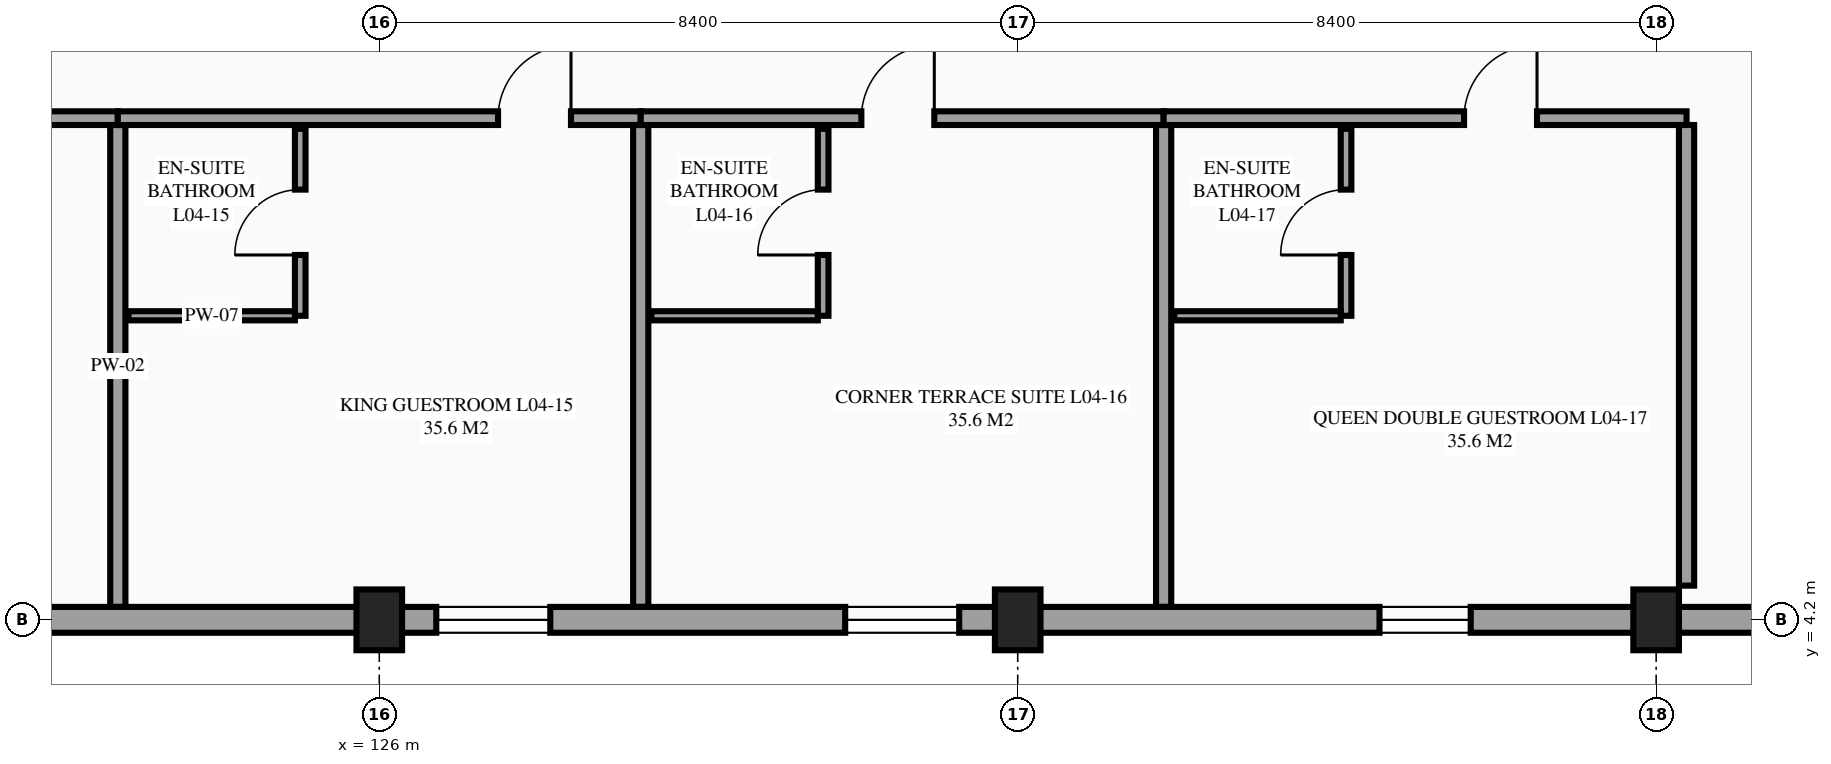
"""IFC4 building model, lengths in metres.
Left out: names, types, materials, properties, quantities, classifications, styles, units other than length and angle.
Written with IfcOpenShell. Run it as: python <this file> out.ifc"""

import sys

from ifc_helpers import new_model, si_unit, direction, frame, frame_2d, origin, origin_2d, place, context, subcontext, project, spatial, rectangle, extrude, element, fill, save


model = new_model("IFC4")
c1 = context("Model", 3, precision=1e-05, world=origin(), true_north=direction((0.0, 1.0)))
c2 = subcontext(c1, "Body", "Model", "MODEL_VIEW")
j1 = project(units=[si_unit("LENGTHUNIT", "METRE"), si_unit("PLANEANGLEUNIT", "RADIAN")], contexts=[c1])
p1 = place(None, origin())
s1 = spatial("IfcSite", under=j1, at=p1, CompositionType="ELEMENT")
p2 = place(p1, origin())
s2 = spatial("IfcBuilding", under=s1, at=p2, CompositionType="ELEMENT")
p3 = place(p2, frame((0.0, 0.0, 18.3)))
s3 = spatial("IfcBuildingStorey", under=s2, at=p3, CompositionType="ELEMENT", Elevation=18.3)
for number, where, z_axis, x_axis in (
    (1, (126.0, 4.2, 0.0), (0.0, 0.0, 1.0), (1.0, 0.0, 0.0)),
    (2, (134.4, 4.2, 0.0), (0.0, 0.0, 1.0), (1.0, 0.0, 0.0)),
    (3, (142.8, 4.2, 0.0), (0.0, 0.0, 1.0), (1.0, 0.0, 0.0)),
):
    element("IfcColumn", number, at=place(p3, frame(where, z_axis=z_axis, x_axis=x_axis)), inside=s3, PredefinedType="COLUMN", context=c2, shape_type="SweptSolid", body=[
        extrude(rectangle(XDim=0.6, YDim=0.8, at=origin_2d()), origin(), (0.0, 0.0, 1.0), 3.6),
    ])
p4 = place(p3, frame((115.68, 10.8, 0.0), z_axis=(0.0, 0.0, 1.0), x_axis=(1.0, 0.0, 0.0)))
e4 = element("IfcWall", 4, at=p4, inside=s3, PredefinedType="PARTITIONING", context=c2, shape_type="SweptSolid", body=[
    extrude(rectangle(XDim=6.88, YDim=0.18, at=frame_2d((3.44, 0.0))), origin(), (0.0, 0.0, 1.0), 3.375),
])
p5 = place(p4, frame((4.653, 0.0, 0.0)))
e5 = element("IfcOpeningElement", 5, at=p5, cuts=e4, PredefinedType="OPENING", context=c2, shape_type="SweptSolid", body=[
    extrude(rectangle(XDim=0.96, YDim=2.15, at=frame_2d((0.48, 1.075))), frame((0.0, 0.1, 0.0), z_axis=(0.0, -1.0, 0.0), x_axis=(1.0, 0.0, 0.0)), (0.0, 0.0, 1.0), 0.2),
])
p6 = place(p3, frame((122.56, 4.37, 0.0), z_axis=(0.0, 0.0, 1.0), x_axis=(0.0, 1.0, 0.0)))
e6 = element("IfcWall", 6, at=p6, inside=s3, PredefinedType="PARTITIONING", context=c2, shape_type="SweptSolid", body=[
    extrude(rectangle(XDim=6.34, YDim=0.2, at=frame_2d((3.17, 0.0))), origin(), (0.0, 0.0, 1.0), 3.375),
])
p7 = place(p3, frame((122.56, 10.8, 0.0), z_axis=(0.0, 0.0, 1.0), x_axis=(1.0, 0.0, 0.0)))
e7 = element("IfcWall", 7, at=p7, inside=s3, PredefinedType="PARTITIONING", context=c2, shape_type="SweptSolid", body=[
    extrude(rectangle(XDim=6.88, YDim=0.18, at=frame_2d((3.44, 0.0))), origin(), (0.0, 0.0, 1.0), 3.375),
])
p8 = place(p7, frame((5.003, 0.0, 0.0)))
e8 = element("IfcOpeningElement", 8, at=p8, cuts=e7, PredefinedType="OPENING", context=c2, shape_type="SweptSolid", body=[
    extrude(rectangle(XDim=0.96, YDim=2.15, at=frame_2d((0.48, 1.075))), frame((0.0, 0.1, 0.0), z_axis=(0.0, -1.0, 0.0), x_axis=(1.0, 0.0, 0.0)), (0.0, 0.0, 1.0), 0.2),
])
p9 = place(p3, frame((129.44, 4.37, 0.0), z_axis=(0.0, 0.0, 1.0), x_axis=(0.0, 1.0, 0.0)))
e9 = element("IfcWall", 9, at=p9, inside=s3, PredefinedType="PARTITIONING", context=c2, shape_type="SweptSolid", body=[
    extrude(rectangle(XDim=6.34, YDim=0.2, at=frame_2d((3.17, 0.0))), origin(), (0.0, 0.0, 1.0), 3.375),
])
p10 = place(p3, frame((124.96, 8.2, 0.0), z_axis=(0.0, 0.0, 1.0), x_axis=(0.0, 1.0, 0.0)))
e10 = element("IfcWall", 10, at=p10, inside=s3, PredefinedType="PARTITIONING", context=c2, shape_type="SweptSolid", body=[
    extrude(rectangle(XDim=2.46, YDim=0.14, at=frame_2d((1.23, 0.0))), origin(), (0.0, 0.0, 1.0), 3.375),
])
p11 = place(p10, frame((0.8, 0.0, 0.0)))
e11 = element("IfcOpeningElement", 11, at=p11, cuts=e10, PredefinedType="OPENING", context=c2, shape_type="SweptSolid", body=[
    extrude(rectangle(XDim=0.86, YDim=2.1, at=frame_2d((0.43, 1.05))), frame((0.0, 0.08, 0.0), z_axis=(0.0, -1.0, 0.0), x_axis=(1.0, 0.0, 0.0)), (0.0, 0.0, 1.0), 0.16),
])
p12 = place(p3, frame((122.7, 8.2, 0.0), z_axis=(0.0, 0.0, 1.0), x_axis=(1.0, 0.0, 0.0)))
e12 = element("IfcWall", 12, at=p12, inside=s3, PredefinedType="PARTITIONING", context=c2, shape_type="SweptSolid", body=[
    extrude(rectangle(XDim=2.19, YDim=0.12, at=frame_2d((1.095, 0.0))), origin(), (0.0, 0.0, 1.0), 3.375),
])
p13 = place(p3, frame((129.44, 10.8, 0.0), z_axis=(0.0, 0.0, 1.0), x_axis=(1.0, 0.0, 0.0)))
e13 = element("IfcWall", 13, at=p13, inside=s3, PredefinedType="PARTITIONING", context=c2, shape_type="SweptSolid", body=[
    extrude(rectangle(XDim=6.88, YDim=0.18, at=frame_2d((3.44, 0.0))), origin(), (0.0, 0.0, 1.0), 3.375),
])
p14 = place(p13, frame((2.903, 0.0, 0.0)))
e14 = element("IfcOpeningElement", 14, at=p14, cuts=e13, PredefinedType="OPENING", context=c2, shape_type="SweptSolid", body=[
    extrude(rectangle(XDim=0.96, YDim=2.15, at=frame_2d((0.48, 1.075))), frame((0.0, 0.1, 0.0), z_axis=(0.0, -1.0, 0.0), x_axis=(1.0, 0.0, 0.0)), (0.0, 0.0, 1.0), 0.2),
])
p15 = place(p3, frame((136.32, 4.37, 0.0), z_axis=(0.0, 0.0, 1.0), x_axis=(0.0, 1.0, 0.0)))
e15 = element("IfcWall", 15, at=p15, inside=s3, PredefinedType="PARTITIONING", context=c2, shape_type="SweptSolid", body=[
    extrude(rectangle(XDim=6.34, YDim=0.2, at=frame_2d((3.17, 0.0))), origin(), (0.0, 0.0, 1.0), 3.375),
])
p16 = place(p3, frame((131.84, 8.2, 0.0), z_axis=(0.0, 0.0, 1.0), x_axis=(0.0, 1.0, 0.0)))
e16 = element("IfcWall", 16, at=p16, inside=s3, PredefinedType="PARTITIONING", context=c2, shape_type="SweptSolid", body=[
    extrude(rectangle(XDim=2.46, YDim=0.14, at=frame_2d((1.23, 0.0))), origin(), (0.0, 0.0, 1.0), 3.375),
])
p17 = place(p16, frame((0.8, 0.0, 0.0)))
e17 = element("IfcOpeningElement", 17, at=p17, cuts=e16, PredefinedType="OPENING", context=c2, shape_type="SweptSolid", body=[
    extrude(rectangle(XDim=0.86, YDim=2.1, at=frame_2d((0.43, 1.05))), frame((0.0, 0.08, 0.0), z_axis=(0.0, -1.0, 0.0), x_axis=(1.0, 0.0, 0.0)), (0.0, 0.0, 1.0), 0.16),
])
p18 = place(p3, frame((129.58, 8.2, 0.0), z_axis=(0.0, 0.0, 1.0), x_axis=(1.0, 0.0, 0.0)))
e18 = element("IfcWall", 18, at=p18, inside=s3, PredefinedType="PARTITIONING", context=c2, shape_type="SweptSolid", body=[
    extrude(rectangle(XDim=2.19, YDim=0.12, at=frame_2d((1.095, 0.0))), origin(), (0.0, 0.0, 1.0), 3.375),
])
p19 = place(p3, frame((136.32, 10.8, 0.0), z_axis=(0.0, 0.0, 1.0), x_axis=(1.0, 0.0, 0.0)))
e19 = element("IfcWall", 19, at=p19, inside=s3, PredefinedType="PARTITIONING", context=c2, shape_type="SweptSolid", body=[
    extrude(rectangle(XDim=6.88, YDim=0.18, at=frame_2d((3.44, 0.0))), origin(), (0.0, 0.0, 1.0), 3.375),
])
p20 = place(p19, frame((3.953, 0.0, 0.0)))
e20 = element("IfcOpeningElement", 20, at=p20, cuts=e19, PredefinedType="OPENING", context=c2, shape_type="SweptSolid", body=[
    extrude(rectangle(XDim=0.96, YDim=2.15, at=frame_2d((0.48, 1.075))), frame((0.0, 0.1, 0.0), z_axis=(0.0, -1.0, 0.0), x_axis=(1.0, 0.0, 0.0)), (0.0, 0.0, 1.0), 0.2),
])
p21 = place(p3, frame((143.2, 4.65, 0.0), z_axis=(0.0, 0.0, 1.0), x_axis=(0.0, 1.0, 0.0)))
e21 = element("IfcWall", 21, at=p21, inside=s3, PredefinedType="PARTITIONING", context=c2, shape_type="SweptSolid", body=[
    extrude(rectangle(XDim=6.06, YDim=0.2, at=frame_2d((3.03, 0.0))), origin(), (0.0, 0.0, 1.0), 3.375),
])
p22 = place(p3, frame((138.72, 8.2, 0.0), z_axis=(0.0, 0.0, 1.0), x_axis=(0.0, 1.0, 0.0)))
e22 = element("IfcWall", 22, at=p22, inside=s3, PredefinedType="PARTITIONING", context=c2, shape_type="SweptSolid", body=[
    extrude(rectangle(XDim=2.46, YDim=0.14, at=frame_2d((1.23, 0.0))), origin(), (0.0, 0.0, 1.0), 3.375),
])
p23 = place(p22, frame((0.8, 0.0, 0.0)))
e23 = element("IfcOpeningElement", 23, at=p23, cuts=e22, PredefinedType="OPENING", context=c2, shape_type="SweptSolid", body=[
    extrude(rectangle(XDim=0.86, YDim=2.1, at=frame_2d((0.43, 1.05))), frame((0.0, 0.08, 0.0), z_axis=(0.0, -1.0, 0.0), x_axis=(1.0, 0.0, 0.0)), (0.0, 0.0, 1.0), 0.16),
])
p24 = place(p3, frame((136.46, 8.2, 0.0), z_axis=(0.0, 0.0, 1.0), x_axis=(1.0, 0.0, 0.0)))
e24 = element("IfcWall", 24, at=p24, inside=s3, PredefinedType="PARTITIONING", context=c2, shape_type="SweptSolid", body=[
    extrude(rectangle(XDim=2.19, YDim=0.12, at=frame_2d((1.095, 0.0))), origin(), (0.0, 0.0, 1.0), 3.375),
])
p25 = place(p3, frame((117.6, 4.2, 0.0), z_axis=(0.0, 0.0, 1.0), x_axis=(1.0, 0.0, 0.0)))
e25 = element("IfcWall", 25, at=p25, inside=s3, PredefinedType="STANDARD", context=c2, shape_type="SweptSolid", body=[
    extrude(rectangle(XDim=8.4, YDim=0.34, at=frame_2d((4.2, 0.0))), origin(), (0.0, 0.0, 1.0), 3.07),
])
p26 = place(p25, frame((0.77, 0.0, 0.85)))
e26 = element("IfcOpeningElement", 26, at=p26, cuts=e25, PredefinedType="OPENING", context=c2, shape_type="SweptSolid", body=[
    extrude(rectangle(XDim=1.5, YDim=1.5, at=frame_2d((0.75, 0.75))), frame((0.0, 0.18, 0.0), z_axis=(0.0, -1.0, 0.0), x_axis=(1.0, 0.0, 0.0)), (0.0, 0.0, 1.0), 0.36),
])
p27 = place(p3, frame((126.0, 4.2, 0.0), z_axis=(0.0, 0.0, 1.0), x_axis=(1.0, 0.0, 0.0)))
e27 = element("IfcWall", 27, at=p27, inside=s3, PredefinedType="STANDARD", context=c2, shape_type="SweptSolid", body=[
    extrude(rectangle(XDim=16.8, YDim=0.34, at=frame_2d((8.4, 0.0))), origin(), (0.0, 0.0, 1.0), 2.68),
])
p28 = place(p27, frame((0.75, 0.0, 0.85)))
e28 = element("IfcOpeningElement", 28, at=p28, cuts=e27, PredefinedType="OPENING", context=c2, shape_type="SweptSolid", body=[
    extrude(rectangle(XDim=1.5, YDim=1.5, at=frame_2d((0.75, 0.75))), frame((0.0, 0.18, 0.0), z_axis=(0.0, -1.0, 0.0), x_axis=(1.0, 0.0, 0.0)), (0.0, 0.0, 1.0), 0.36),
])
p29 = place(p27, frame((6.13, 0.0, 0.85)))
e29 = element("IfcOpeningElement", 29, at=p29, cuts=e27, PredefinedType="OPENING", context=c2, shape_type="SweptSolid", body=[
    extrude(rectangle(XDim=1.5, YDim=1.5, at=frame_2d((0.75, 0.75))), frame((0.0, 0.18, 0.0), z_axis=(0.0, -1.0, 0.0), x_axis=(1.0, 0.0, 0.0)), (0.0, 0.0, 1.0), 0.36),
])
p30 = place(p27, frame((13.16, 0.0, 0.85)))
e30 = element("IfcOpeningElement", 30, at=p30, cuts=e27, PredefinedType="OPENING", context=c2, shape_type="SweptSolid", body=[
    extrude(rectangle(XDim=1.2, YDim=1.5, at=frame_2d((0.6, 0.75))), frame((0.0, 0.18, 0.0), z_axis=(0.0, -1.0, 0.0), x_axis=(1.0, 0.0, 0.0)), (0.0, 0.0, 1.0), 0.36),
])
p31 = place(p3, frame((142.8, 4.2, 0.0), z_axis=(0.0, 0.0, 1.0), x_axis=(1.0, 0.0, 0.0)))
e31 = element("IfcWall", 31, at=p31, inside=s3, PredefinedType="STANDARD", context=c2, shape_type="SweptSolid", body=[
    extrude(rectangle(XDim=8.4, YDim=0.34, at=frame_2d((4.2, 0.0))), origin(), (0.0, 0.0, 1.0), 3.126),
])
p32 = place(p28, origin())
e32 = element("IfcWindow", 32, at=p32, inside=s3, PartitioningType="SINGLE_PANEL", PredefinedType="WINDOW", context=c2, shape_type="SweptSolid", body=[
    extrude(rectangle(XDim=1.5, YDim=1.5, at=frame_2d((0.75, 0.75))), frame((0.0, 0.03, 0.0), z_axis=(0.0, -1.0, 0.0), x_axis=(1.0, 0.0, 0.0)), (0.0, 0.0, 1.0), 0.06),
])
fill(e28, e32)
p33 = place(p29, origin())
e33 = element("IfcWindow", 33, at=p33, inside=s3, PartitioningType="SINGLE_PANEL", PredefinedType="WINDOW", context=c2, shape_type="SweptSolid", body=[
    extrude(rectangle(XDim=1.5, YDim=1.5, at=frame_2d((0.75, 0.75))), frame((0.0, 0.03, 0.0), z_axis=(0.0, -1.0, 0.0), x_axis=(1.0, 0.0, 0.0)), (0.0, 0.0, 1.0), 0.06),
])
fill(e29, e33)
p34 = place(p30, origin())
e34 = element("IfcWindow", 34, at=p34, inside=s3, PartitioningType="SINGLE_PANEL", PredefinedType="WINDOW", context=c2, shape_type="SweptSolid", body=[
    extrude(rectangle(XDim=1.2, YDim=1.5, at=frame_2d((0.6, 0.75))), frame((0.0, 0.03, 0.0), z_axis=(0.0, -1.0, 0.0), x_axis=(1.0, 0.0, 0.0)), (0.0, 0.0, 1.0), 0.06),
])
fill(e30, e34)
p35 = place(p8, origin())
e35 = element("IfcDoor", 35, at=p35, inside=s3, OperationType="SINGLE_SWING_RIGHT", PredefinedType="DOOR", context=c2, shape_type="SweptSolid", body=[
    extrude(rectangle(XDim=0.96, YDim=2.15, at=frame_2d((0.48, 1.075))), frame((0.0, 0.025, 0.0), z_axis=(0.0, -1.0, 0.0), x_axis=(1.0, 0.0, 0.0)), (0.0, 0.0, 1.0), 0.05),
])
fill(e8, e35)
p36 = place(p11, origin())
e36 = element("IfcDoor", 36, at=p36, inside=s3, OperationType="SINGLE_SWING_LEFT", PredefinedType="DOOR", context=c2, shape_type="SweptSolid", body=[
    extrude(rectangle(XDim=0.86, YDim=2.1, at=frame_2d((0.43, 1.05))), frame((0.0, 0.025, 0.0), z_axis=(0.0, -1.0, 0.0), x_axis=(1.0, 0.0, 0.0)), (0.0, 0.0, 1.0), 0.05),
])
fill(e11, e36)
p37 = place(p14, origin())
e37 = element("IfcDoor", 37, at=p37, inside=s3, OperationType="SINGLE_SWING_RIGHT", PredefinedType="DOOR", context=c2, shape_type="SweptSolid", body=[
    extrude(rectangle(XDim=0.96, YDim=2.15, at=frame_2d((0.48, 1.075))), frame((0.0, 0.025, 0.0), z_axis=(0.0, -1.0, 0.0), x_axis=(1.0, 0.0, 0.0)), (0.0, 0.0, 1.0), 0.05),
])
fill(e14, e37)
p38 = place(p17, origin())
e38 = element("IfcDoor", 38, at=p38, inside=s3, OperationType="SINGLE_SWING_LEFT", PredefinedType="DOOR", context=c2, shape_type="SweptSolid", body=[
    extrude(rectangle(XDim=0.86, YDim=2.1, at=frame_2d((0.43, 1.05))), frame((0.0, 0.025, 0.0), z_axis=(0.0, -1.0, 0.0), x_axis=(1.0, 0.0, 0.0)), (0.0, 0.0, 1.0), 0.05),
])
fill(e17, e38)
p39 = place(p20, origin())
e39 = element("IfcDoor", 39, at=p39, inside=s3, OperationType="SINGLE_SWING_RIGHT", PredefinedType="DOOR", context=c2, shape_type="SweptSolid", body=[
    extrude(rectangle(XDim=0.96, YDim=2.15, at=frame_2d((0.48, 1.075))), frame((0.0, 0.025, 0.0), z_axis=(0.0, -1.0, 0.0), x_axis=(1.0, 0.0, 0.0)), (0.0, 0.0, 1.0), 0.05),
])
fill(e20, e39)
p40 = place(p23, origin())
e40 = element("IfcDoor", 40, at=p40, inside=s3, OperationType="SINGLE_SWING_LEFT", PredefinedType="DOOR", context=c2, shape_type="SweptSolid", body=[
    extrude(rectangle(XDim=0.86, YDim=2.1, at=frame_2d((0.43, 1.05))), frame((0.0, 0.025, 0.0), z_axis=(0.0, -1.0, 0.0), x_axis=(1.0, 0.0, 0.0)), (0.0, 0.0, 1.0), 0.05),
])
fill(e23, e40)
save(model, sys.argv[1])
